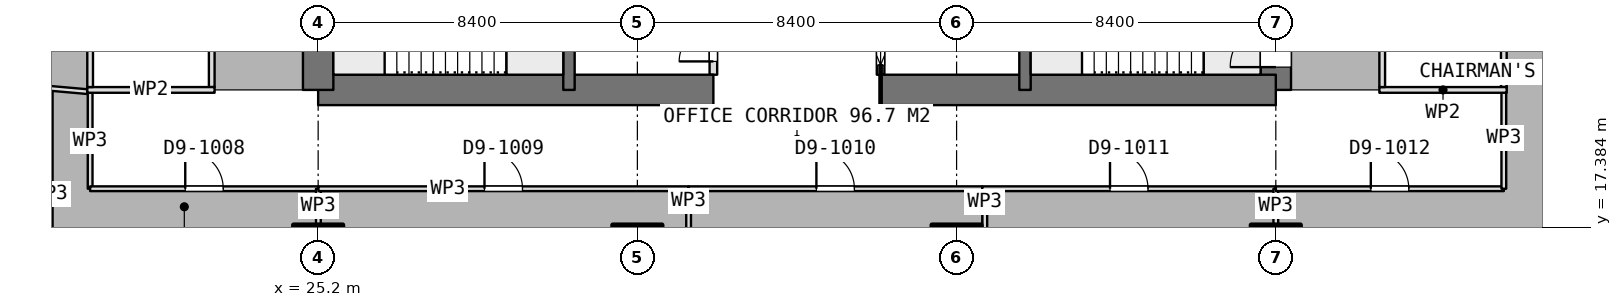
"""IFC4 building model, lengths in metres.
Left out: names, types, materials, properties, quantities, classifications, styles, units other than length and angle.
Written with IfcOpenShell. Run it as: python <this file> out.ifc"""

import sys

from ifc_helpers import new_model, si_unit, direction, frame, frame_2d, origin, origin_2d, place, context, subcontext, project, spatial, rectangle, extrude, element, fill, save


model = new_model("IFC4")
c1 = context("Model", 3, precision=1e-05, world=origin(), true_north=direction((0.0, 1.0)))
c2 = subcontext(c1, "Body", "Model", "MODEL_VIEW")
j1 = project(units=[si_unit("LENGTHUNIT", "METRE"), si_unit("PLANEANGLEUNIT", "RADIAN")], contexts=[c1])
p1 = place(None, origin())
s1 = spatial("IfcSite", under=j1, at=p1, CompositionType="ELEMENT")
p2 = place(p1, origin())
s2 = spatial("IfcBuilding", under=s1, at=p2, CompositionType="ELEMENT")
p3 = place(p2, frame((0.0, 0.0, 272.6)))
s3 = spatial("IfcBuildingStorey", under=s2, at=p3, CompositionType="ELEMENT", Elevation=272.6)
p4 = place(p3, frame((25.2, 21.0, 0.0), z_axis=(0.0, 0.0, 1.0), x_axis=(1.0, 0.0, 0.0)))
e1 = element("IfcWall", 1, at=p4, inside=s3, PredefinedType="SHEAR", context=c2, shape_type="SweptSolid", body=[
    extrude(rectangle(XDim=10.4, YDim=0.8, at=frame_2d((5.2, 0.0))), origin(), (0.0, 0.0, 1.0), 3.75),
])
p5 = place(p3, frame((40.0, 21.0, 0.0), z_axis=(0.0, 0.0, 1.0), x_axis=(1.0, 0.0, 0.0)))
e2 = element("IfcWall", 2, at=p5, inside=s3, PredefinedType="SHEAR", context=c2, shape_type="SweptSolid", body=[
    extrude(rectangle(XDim=10.4, YDim=0.8, at=frame_2d((5.2, 0.0))), origin(), (0.0, 0.0, 1.0), 3.75),
])
p6 = place(p3, frame((25.2, 21.0, 0.0), z_axis=(0.0, 0.0, 1.0), x_axis=(0.0, 1.0, 0.0)))
e3 = element("IfcWall", 3, at=p6, inside=s3, PredefinedType="SHEAR", context=c2, shape_type="SweptSolid", body=[
    extrude(rectangle(XDim=25.2, YDim=0.8, at=frame_2d((12.6, 0.0))), origin(), (0.0, 0.0, 1.0), 3.75),
])
p7 = place(p6, frame((7.8, 0.0, 0.0)))
e4 = element("IfcOpeningElement", 4, at=p7, cuts=e3, PredefinedType="OPENING", context=c2, shape_type="SweptSolid", body=[
    extrude(rectangle(XDim=1.2, YDim=2.1, at=frame_2d((0.6, 1.05))), frame((0.0, 0.41, 0.0), z_axis=(0.0, -1.0, 0.0), x_axis=(1.0, 0.0, 0.0)), (0.0, 0.0, 1.0), 0.82),
])
p8 = place(p6, frame((14.25, 0.0, 0.0)))
e5 = element("IfcOpeningElement", 5, at=p8, cuts=e3, PredefinedType="OPENING", context=c2, shape_type="SweptSolid", body=[
    extrude(rectangle(XDim=0.9, YDim=2.1, at=frame_2d((0.45, 1.05))), frame((0.0, 0.41, 0.0), z_axis=(0.0, -1.0, 0.0), x_axis=(1.0, 0.0, 0.0)), (0.0, 0.0, 1.0), 0.82),
])
p9 = place(p6, frame((16.85, 0.0, 0.0)))
e6 = element("IfcOpeningElement", 6, at=p9, cuts=e3, PredefinedType="OPENING", context=c2, shape_type="SweptSolid", body=[
    extrude(rectangle(XDim=0.9, YDim=2.1, at=frame_2d((0.45, 1.05))), frame((0.0, 0.41, 0.0), z_axis=(0.0, -1.0, 0.0), x_axis=(1.0, 0.0, 0.0)), (0.0, 0.0, 1.0), 0.82),
])
p10 = place(p6, frame((18.95, 0.0, 0.0)))
e7 = element("IfcOpeningElement", 7, at=p10, cuts=e3, PredefinedType="OPENING", context=c2, shape_type="SweptSolid", body=[
    extrude(rectangle(XDim=1.2, YDim=2.1, at=frame_2d((0.6, 1.05))), frame((0.0, 0.41, 0.0), z_axis=(0.0, -1.0, 0.0), x_axis=(1.0, 0.0, 0.0)), (0.0, 0.0, 1.0), 0.82),
])
p11 = place(p3, frame((50.4, 21.0, 0.0), z_axis=(0.0, 0.0, 1.0), x_axis=(0.0, 1.0, 0.0)))
e8 = element("IfcWall", 8, at=p11, inside=s3, PredefinedType="SHEAR", context=c2, shape_type="SweptSolid", body=[
    extrude(rectangle(XDim=25.2, YDim=0.8, at=frame_2d((12.6, 0.0))), origin(), (0.0, 0.0, 1.0), 3.75),
])
p12 = place(p11, frame((16.2, 0.0, 0.0)))
e9 = element("IfcOpeningElement", 9, at=p12, cuts=e8, PredefinedType="OPENING", context=c2, shape_type="SweptSolid", body=[
    extrude(rectangle(XDim=1.2, YDim=2.1, at=frame_2d((0.6, 1.05))), frame((0.0, 0.41, 0.0), z_axis=(0.0, -1.0, 0.0), x_axis=(1.0, 0.0, 0.0)), (0.0, 0.0, 1.0), 0.82),
])
p13 = place(p11, frame((10.05, 0.0, 0.0)))
e10 = element("IfcOpeningElement", 10, at=p13, cuts=e8, PredefinedType="OPENING", context=c2, shape_type="SweptSolid", body=[
    extrude(rectangle(XDim=0.9, YDim=2.1, at=frame_2d((0.45, 1.05))), frame((0.0, 0.41, 0.0), z_axis=(0.0, -1.0, 0.0), x_axis=(1.0, 0.0, 0.0)), (0.0, 0.0, 1.0), 0.82),
])
p14 = place(p11, frame((7.45, 0.0, 0.0)))
e11 = element("IfcOpeningElement", 11, at=p14, cuts=e8, PredefinedType="OPENING", context=c2, shape_type="SweptSolid", body=[
    extrude(rectangle(XDim=0.9, YDim=2.1, at=frame_2d((0.45, 1.05))), frame((0.0, 0.41, 0.0), z_axis=(0.0, -1.0, 0.0), x_axis=(1.0, 0.0, 0.0)), (0.0, 0.0, 1.0), 0.82),
])
p15 = place(p11, frame((0.6, 0.0, 0.0)))
e12 = element("IfcOpeningElement", 12, at=p15, cuts=e8, PredefinedType="OPENING", context=c2, shape_type="SweptSolid", body=[
    extrude(rectangle(XDim=1.2, YDim=2.1, at=frame_2d((0.6, 1.05))), frame((0.0, 0.41, 0.0), z_axis=(0.0, -1.0, 0.0), x_axis=(1.0, 0.0, 0.0)), (0.0, 0.0, 1.0), 0.82),
])
for number, where, z_axis, x_axis in (
    (13, (31.8, 21.0, 0.0), (0.0, 0.0, 1.0), (0.0, 1.0, 0.0)),
    (14, (43.8, 21.0, 0.0), (0.0, 0.0, 1.0), (0.0, 1.0, 0.0)),
):
    element("IfcWall", number, at=place(p3, frame(where, z_axis=z_axis, x_axis=x_axis)), inside=s3, PredefinedType="SHEAR", context=c2, shape_type="SweptSolid", body=[
        extrude(rectangle(XDim=25.2, YDim=0.3, at=frame_2d((12.6, 0.0))), origin(), (0.0, 0.0, 1.0), 3.75),
    ])
for number, where, z_axis, x_axis in (
    (15, (25.2, 16.8, 0.0), (0.0, 0.0, 1.0), (1.0, 0.0, 0.0)),
    (16, (33.6, 16.8, 0.0), (0.0, 0.0, 1.0), (1.0, 0.0, 0.0)),
    (17, (42.0, 16.8, 0.0), (0.0, 0.0, 1.0), (1.0, 0.0, 0.0)),
    (18, (50.4, 16.8, 0.0), (0.0, 0.0, 1.0), (1.0, 0.0, 0.0)),
):
    element("IfcColumn", number, at=place(p3, frame(where, z_axis=z_axis, x_axis=x_axis)), inside=s3, PredefinedType="COLUMN", context=c2, shape_type="SweptSolid", body=[
        extrude(rectangle(XDim=1.3, YDim=1.3, at=origin_2d()), origin(), (0.0, 0.0, 1.0), 3.75),
    ])
p16 = place(p3, frame((40.0, 21.4, 0.0), z_axis=(0.0, 0.0, 1.0), x_axis=(0.0, 1.0, 0.0)))
e19 = element("IfcWall", 19, at=p16, inside=s3, PredefinedType="PARTITIONING", context=c2, shape_type="SweptSolid", body=[
    extrude(rectangle(XDim=1.85, YDim=0.2, at=frame_2d((0.925, 0.0))), origin(), (0.0, 0.0, 1.0), 3.5),
])
p17 = place(p16, frame((0.25, 0.0, 0.0)))
e20 = element("IfcOpeningElement", 20, at=p17, cuts=e19, PredefinedType="OPENING", context=c2, shape_type="SweptSolid", body=[
    extrude(rectangle(XDim=1.1, YDim=2.1, at=frame_2d((0.55, 1.05))), frame((0.0, 0.11, 0.0), z_axis=(0.0, -1.0, 0.0), x_axis=(1.0, 0.0, 0.0)), (0.0, 0.0, 1.0), 0.22),
])
p18 = place(p3, frame((35.6, 21.4, 0.0), z_axis=(0.0, 0.0, 1.0), x_axis=(0.0, 1.0, 0.0)))
e21 = element("IfcWall", 21, at=p18, inside=s3, PredefinedType="PARTITIONING", context=c2, shape_type="SweptSolid", body=[
    extrude(rectangle(XDim=1.85, YDim=0.2, at=frame_2d((0.925, 0.0))), origin(), (0.0, 0.0, 1.0), 3.5),
])
p19 = place(p18, frame((0.35, 0.0, 0.0)))
e22 = element("IfcOpeningElement", 22, at=p19, cuts=e21, PredefinedType="OPENING", context=c2, shape_type="SweptSolid", body=[
    extrude(rectangle(XDim=0.9, YDim=2.1, at=frame_2d((0.45, 1.05))), frame((0.0, 0.11, 0.0), z_axis=(0.0, -1.0, 0.0), x_axis=(1.0, 0.0, 0.0)), (0.0, 0.0, 1.0), 0.22),
])
p20 = place(p3, frame((19.125, 21.0, 0.0), z_axis=(0.0, 0.0, 1.0), x_axis=(1.0, 0.0, 0.0)))
e23 = element("IfcWall", 23, at=p20, inside=s3, PredefinedType="PARTITIONING", context=c2, shape_type="SweptSolid", body=[
    extrude(rectangle(XDim=3.35, YDim=0.15, at=frame_2d((1.675, 0.0))), origin(), (0.0, 0.0, 1.0), 3.5),
])
p21 = place(p3, frame((19.2, 21.075, 0.0), z_axis=(0.0, 0.0, 1.0), x_axis=(0.0, 1.0, 0.0)))
e24 = element("IfcWall", 24, at=p21, inside=s3, PredefinedType="PARTITIONING", context=c2, shape_type="SweptSolid", body=[
    extrude(rectangle(XDim=6.85, YDim=0.15, at=frame_2d((3.425, 0.0))), origin(), (0.0, 0.0, 1.0), 3.5),
])
p22 = place(p3, frame((22.4, 21.075, 0.0), z_axis=(0.0, 0.0, 1.0), x_axis=(0.0, 1.0, 0.0)))
e25 = element("IfcWall", 25, at=p22, inside=s3, PredefinedType="PARTITIONING", context=c2, shape_type="SweptSolid", body=[
    extrude(rectangle(XDim=6.85, YDim=0.15, at=frame_2d((3.425, 0.0))), origin(), (0.0, 0.0, 1.0), 3.5),
])
p23 = place(p22, frame((2.925, 0.0, 0.0)))
e26 = element("IfcOpeningElement", 26, at=p23, cuts=e25, PredefinedType="OPENING", context=c2, shape_type="SweptSolid", body=[
    extrude(rectangle(XDim=1.0, YDim=2.1, at=frame_2d((0.5, 1.05))), frame((0.0, 0.085, 0.0), z_axis=(0.0, -1.0, 0.0), x_axis=(1.0, 0.0, 0.0)), (0.0, 0.0, 1.0), 0.17),
])
p24 = place(p3, frame((53.125, 21.0, 0.0), z_axis=(0.0, 0.0, 1.0), x_axis=(1.0, 0.0, 0.0)))
e27 = element("IfcWall", 27, at=p24, inside=s3, PredefinedType="PARTITIONING", context=c2, shape_type="SweptSolid", body=[
    extrude(rectangle(XDim=3.35, YDim=0.15, at=frame_2d((1.675, 0.0))), origin(), (0.0, 0.0, 1.0), 3.5),
])
p25 = place(p3, frame((53.2, 21.075, 0.0), z_axis=(0.0, 0.0, 1.0), x_axis=(0.0, 1.0, 0.0)))
e28 = element("IfcWall", 28, at=p25, inside=s3, PredefinedType="PARTITIONING", context=c2, shape_type="SweptSolid", body=[
    extrude(rectangle(XDim=6.85, YDim=0.15, at=frame_2d((3.425, 0.0))), origin(), (0.0, 0.0, 1.0), 3.5),
])
p26 = place(p25, frame((2.925, 0.0, 0.0)))
e29 = element("IfcOpeningElement", 29, at=p26, cuts=e28, PredefinedType="OPENING", context=c2, shape_type="SweptSolid", body=[
    extrude(rectangle(XDim=1.0, YDim=2.1, at=frame_2d((0.5, 1.05))), frame((0.0, 0.085, 0.0), z_axis=(0.0, -1.0, 0.0), x_axis=(1.0, 0.0, 0.0)), (0.0, 0.0, 1.0), 0.17),
])
p27 = place(p3, frame((56.4, 21.075, 0.0), z_axis=(0.0, 0.0, 1.0), x_axis=(0.0, 1.0, 0.0)))
e30 = element("IfcWall", 30, at=p27, inside=s3, PredefinedType="PARTITIONING", context=c2, shape_type="SweptSolid", body=[
    extrude(rectangle(XDim=6.85, YDim=0.15, at=frame_2d((3.425, 0.0))), origin(), (0.0, 0.0, 1.0), 3.5),
])
p28 = place(p3, frame((34.948, 15.114, 0.0), z_axis=(0.0, 0.0, 1.0), x_axis=(0.0, 1.0, 0.0)))
e31 = element("IfcWall", 31, at=p28, inside=s3, PredefinedType="PARTITIONING", context=c2, shape_type="SweptSolid", body=[
    extrude(rectangle(XDim=3.286, YDim=0.125, at=frame_2d((1.643, 0.0))), origin(), (0.0, 0.0, 1.0), 3.5),
])
p29 = place(p3, frame((34.948, 18.4, 0.0), z_axis=(0.0, 0.0, 1.0), x_axis=(1.0, 0.0, 0.0)))
e32 = element("IfcWall", 32, at=p29, inside=s3, PredefinedType="PARTITIONING", context=c2, shape_type="SweptSolid", body=[
    extrude(rectangle(XDim=7.725, YDim=0.125, at=frame_2d((3.863, 0.0))), origin(), (0.0, 0.0, 1.0), 3.5),
])
p30 = place(p29, frame((3.363, 0.0, 0.0)))
e33 = element("IfcOpeningElement", 33, at=p30, cuts=e32, PredefinedType="OPENING", context=c2, shape_type="SweptSolid", body=[
    extrude(rectangle(XDim=1.0, YDim=2.1, at=frame_2d((0.5, 1.05))), frame((0.0, 0.073, 0.0), z_axis=(0.0, -1.0, 0.0), x_axis=(1.0, 0.0, 0.0)), (0.0, 0.0, 1.0), 0.145),
])
p31 = place(p3, frame((42.742, 18.337, 0.0), z_axis=(0.0, 0.0, 1.0), x_axis=(0.0, -1.0, 0.0)))
e34 = element("IfcWall", 34, at=p31, inside=s3, PredefinedType="PARTITIONING", context=c2, shape_type="SweptSolid", body=[
    extrude(rectangle(XDim=2.799, YDim=0.125, at=frame_2d((1.399, 0.0))), origin(), (0.0, 0.0, 1.0), 3.5),
])
p32 = place(p3, frame((42.674, 18.4, 0.0), z_axis=(0.0, 0.0, 1.0), x_axis=(1.0, 0.0, 0.0)))
e35 = element("IfcWall", 35, at=p32, inside=s3, PredefinedType="PARTITIONING", context=c2, shape_type="SweptSolid", body=[
    extrude(rectangle(XDim=7.726, YDim=0.125, at=frame_2d((3.863, 0.0))), origin(), (0.0, 0.0, 1.0), 3.5),
])
p33 = place(p32, frame((3.363, 0.0, 0.0)))
e36 = element("IfcOpeningElement", 36, at=p33, cuts=e35, PredefinedType="OPENING", context=c2, shape_type="SweptSolid", body=[
    extrude(rectangle(XDim=1.0, YDim=2.1, at=frame_2d((0.5, 1.05))), frame((0.0, 0.073, 0.0), z_axis=(0.0, -1.0, 0.0), x_axis=(1.0, 0.0, 0.0)), (0.0, 0.0, 1.0), 0.145),
])
p34 = place(p3, frame((50.4, 18.4, 0.0), z_axis=(0.0, 0.0, 1.0), x_axis=(0.0, -1.0, 0.0)))
e37 = element("IfcWall", 37, at=p34, inside=s3, PredefinedType="PARTITIONING", context=c2, shape_type="SweptSolid", body=[
    extrude(rectangle(XDim=0.93, YDim=0.125, at=frame_2d((0.465, 0.0))), origin(), (0.0, 0.0, 1.0), 3.5),
])
p35 = place(p3, frame((50.401, 18.4, 0.0), z_axis=(0.0, 0.0, 1.0), x_axis=(1.0, 0.0, 0.0)))
e38 = element("IfcWall", 38, at=p35, inside=s3, PredefinedType="PARTITIONING", context=c2, shape_type="SweptSolid", body=[
    extrude(rectangle(XDim=5.999, YDim=0.125, at=frame_2d((3.0, 0.0))), origin(), (0.0, 0.0, 1.0), 3.5),
])
p36 = place(p35, frame((2.499, 0.0, 0.0)))
e39 = element("IfcOpeningElement", 39, at=p36, cuts=e38, PredefinedType="OPENING", context=c2, shape_type="SweptSolid", body=[
    extrude(rectangle(XDim=1.0, YDim=2.1, at=frame_2d((0.5, 1.05))), frame((0.0, 0.073, 0.0), z_axis=(0.0, -1.0, 0.0), x_axis=(1.0, 0.0, 0.0)), (0.0, 0.0, 1.0), 0.145),
])
p37 = place(p3, frame((56.4, 18.4, 0.0), z_axis=(0.0, 0.0, 1.0), x_axis=(0.0, 1.0, 0.0)))
e40 = element("IfcWall", 40, at=p37, inside=s3, PredefinedType="PARTITIONING", context=c2, shape_type="SweptSolid", body=[
    extrude(rectangle(XDim=2.675, YDim=0.125, at=frame_2d((1.337, 0.0))), origin(), (0.0, 0.0, 1.0), 3.5),
])
p38 = place(p3, frame((18.149, 21.041, 0.0), z_axis=(0.0, 0.0, 1.0), x_axis=(0.0, -1.0, 0.0)))
e41 = element("IfcWall", 41, at=p38, inside=s3, PredefinedType="PARTITIONING", context=c2, shape_type="SweptSolid", body=[
    extrude(rectangle(XDim=5.541, YDim=0.125, at=frame_2d((2.771, 0.0))), origin(), (0.0, 0.0, 1.0), 3.5),
])
p39 = place(p3, frame((18.15, 21.041, 0.0), z_axis=(0.0, 0.0, 1.0), x_axis=(0.996138836376, -0.087791905459, 0.0)))
e42 = element("IfcWall", 42, at=p39, inside=s3, PredefinedType="PARTITIONING", context=c2, shape_type="SweptSolid", body=[
    extrude(rectangle(XDim=0.979, YDim=0.125, at=frame_2d((0.489, 0.0))), origin(), (0.0, 0.0, 1.0), 3.5),
])
p40 = place(p3, frame((19.2, 20.925, 0.0), z_axis=(0.0, 0.0, 1.0), x_axis=(0.0, -1.0, 0.0)))
e43 = element("IfcWall", 43, at=p40, inside=s3, PredefinedType="PARTITIONING", context=c2, shape_type="SweptSolid", body=[
    extrude(rectangle(XDim=2.525, YDim=0.125, at=frame_2d((1.263, 0.0))), origin(), (0.0, 0.0, 1.0), 3.5),
])
p41 = place(p3, frame((19.2, 18.4, 0.0), z_axis=(0.0, 0.0, 1.0), x_axis=(1.0, 0.0, 0.0)))
e44 = element("IfcWall", 44, at=p41, inside=s3, PredefinedType="PARTITIONING", context=c2, shape_type="SweptSolid", body=[
    extrude(rectangle(XDim=6.006, YDim=0.125, at=frame_2d((3.003, 0.0))), origin(), (0.0, 0.0, 1.0), 3.5),
])
p42 = place(p41, frame((2.503, 0.0, 0.0)))
e45 = element("IfcOpeningElement", 45, at=p42, cuts=e44, PredefinedType="OPENING", context=c2, shape_type="SweptSolid", body=[
    extrude(rectangle(XDim=1.0, YDim=2.1, at=frame_2d((0.5, 1.05))), frame((0.0, 0.073, 0.0), z_axis=(0.0, -1.0, 0.0), x_axis=(1.0, 0.0, 0.0)), (0.0, 0.0, 1.0), 0.145),
])
p43 = place(p3, frame((25.206, 18.4, 0.0), z_axis=(0.0, 0.0, 1.0), x_axis=(0.0, -1.0, 0.0)))
e46 = element("IfcWall", 46, at=p43, inside=s3, PredefinedType="PARTITIONING", context=c2, shape_type="SweptSolid", body=[
    extrude(rectangle(XDim=0.93, YDim=0.125, at=frame_2d((0.465, 0.0))), origin(), (0.0, 0.0, 1.0), 3.5),
])
p44 = place(p3, frame((25.207, 18.4, 0.0), z_axis=(0.0, 0.0, 1.0), x_axis=(1.0, 0.0, 0.0)))
e47 = element("IfcWall", 47, at=p44, inside=s3, PredefinedType="PARTITIONING", context=c2, shape_type="SweptSolid", body=[
    extrude(rectangle(XDim=9.74, YDim=0.125, at=frame_2d((4.87, 0.0))), origin(), (0.0, 0.0, 1.0), 3.5),
])
p45 = place(p44, frame((4.37, 0.0, 0.0)))
e48 = element("IfcOpeningElement", 48, at=p45, cuts=e47, PredefinedType="OPENING", context=c2, shape_type="SweptSolid", body=[
    extrude(rectangle(XDim=1.0, YDim=2.1, at=frame_2d((0.5, 1.05))), frame((0.0, 0.073, 0.0), z_axis=(0.0, -1.0, 0.0), x_axis=(1.0, 0.0, 0.0)), (0.0, 0.0, 1.0), 0.145),
])
p46 = place(p17, origin())
e49 = element("IfcDoor", 49, at=p46, inside=s3, OperationType="SLIDING_TO_LEFT", PredefinedType="DOOR", context=c2, shape_type="SweptSolid", body=[
    extrude(rectangle(XDim=1.1, YDim=2.1, at=frame_2d((0.55, 1.05))), frame((0.0, 0.025, 0.0), z_axis=(0.0, -1.0, 0.0), x_axis=(1.0, 0.0, 0.0)), (0.0, 0.0, 1.0), 0.05),
])
fill(e20, e49)
p47 = place(p19, origin())
e50 = element("IfcDoor", 50, at=p47, inside=s3, OperationType="SINGLE_SWING_LEFT", PredefinedType="DOOR", context=c2, shape_type="SweptSolid", body=[
    extrude(rectangle(XDim=0.9, YDim=2.1, at=frame_2d((0.45, 1.05))), frame((0.0, 0.025, 0.0), z_axis=(0.0, -1.0, 0.0), x_axis=(1.0, 0.0, 0.0)), (0.0, 0.0, 1.0), 0.05),
])
fill(e22, e50)
p48 = place(p30, origin())
e51 = element("IfcDoor", 51, at=p48, inside=s3, OperationType="SINGLE_SWING_LEFT", PredefinedType="DOOR", context=c2, shape_type="SweptSolid", body=[
    extrude(rectangle(XDim=1.0, YDim=2.1, at=frame_2d((0.5, 1.05))), frame((0.0, 0.025, 0.0), z_axis=(0.0, -1.0, 0.0), x_axis=(1.0, 0.0, 0.0)), (0.0, 0.0, 1.0), 0.05),
])
fill(e33, e51)
p49 = place(p33, origin())
e52 = element("IfcDoor", 52, at=p49, inside=s3, OperationType="SINGLE_SWING_LEFT", PredefinedType="DOOR", context=c2, shape_type="SweptSolid", body=[
    extrude(rectangle(XDim=1.0, YDim=2.1, at=frame_2d((0.5, 1.05))), frame((0.0, 0.025, 0.0), z_axis=(0.0, -1.0, 0.0), x_axis=(1.0, 0.0, 0.0)), (0.0, 0.0, 1.0), 0.05),
])
fill(e36, e52)
p50 = place(p36, origin())
e53 = element("IfcDoor", 53, at=p50, inside=s3, OperationType="SINGLE_SWING_LEFT", PredefinedType="DOOR", context=c2, shape_type="SweptSolid", body=[
    extrude(rectangle(XDim=1.0, YDim=2.1, at=frame_2d((0.5, 1.05))), frame((0.0, 0.025, 0.0), z_axis=(0.0, -1.0, 0.0), x_axis=(1.0, 0.0, 0.0)), (0.0, 0.0, 1.0), 0.05),
])
fill(e39, e53)
p51 = place(p42, origin())
e54 = element("IfcDoor", 54, at=p51, inside=s3, OperationType="SINGLE_SWING_LEFT", PredefinedType="DOOR", context=c2, shape_type="SweptSolid", body=[
    extrude(rectangle(XDim=1.0, YDim=2.1, at=frame_2d((0.5, 1.05))), frame((0.0, 0.025, 0.0), z_axis=(0.0, -1.0, 0.0), x_axis=(1.0, 0.0, 0.0)), (0.0, 0.0, 1.0), 0.05),
])
fill(e45, e54)
p52 = place(p45, origin())
e55 = element("IfcDoor", 55, at=p52, inside=s3, OperationType="SINGLE_SWING_LEFT", PredefinedType="DOOR", context=c2, shape_type="SweptSolid", body=[
    extrude(rectangle(XDim=1.0, YDim=2.1, at=frame_2d((0.5, 1.05))), frame((0.0, 0.025, 0.0), z_axis=(0.0, -1.0, 0.0), x_axis=(1.0, 0.0, 0.0)), (0.0, 0.0, 1.0), 0.05),
])
fill(e48, e55)
p53 = place(p15, origin())
e56 = element("IfcDoor", 56, at=p53, inside=s3, OperationType="SINGLE_SWING_RIGHT", PredefinedType="DOOR", context=c2, shape_type="SweptSolid", body=[
    extrude(rectangle(XDim=1.2, YDim=2.1, at=frame_2d((0.6, 1.05))), frame((0.0, 0.025, 0.0), z_axis=(0.0, -1.0, 0.0), x_axis=(1.0, 0.0, 0.0)), (0.0, 0.0, 1.0), 0.05),
])
fill(e12, e56)
save(model, sys.argv[1])
